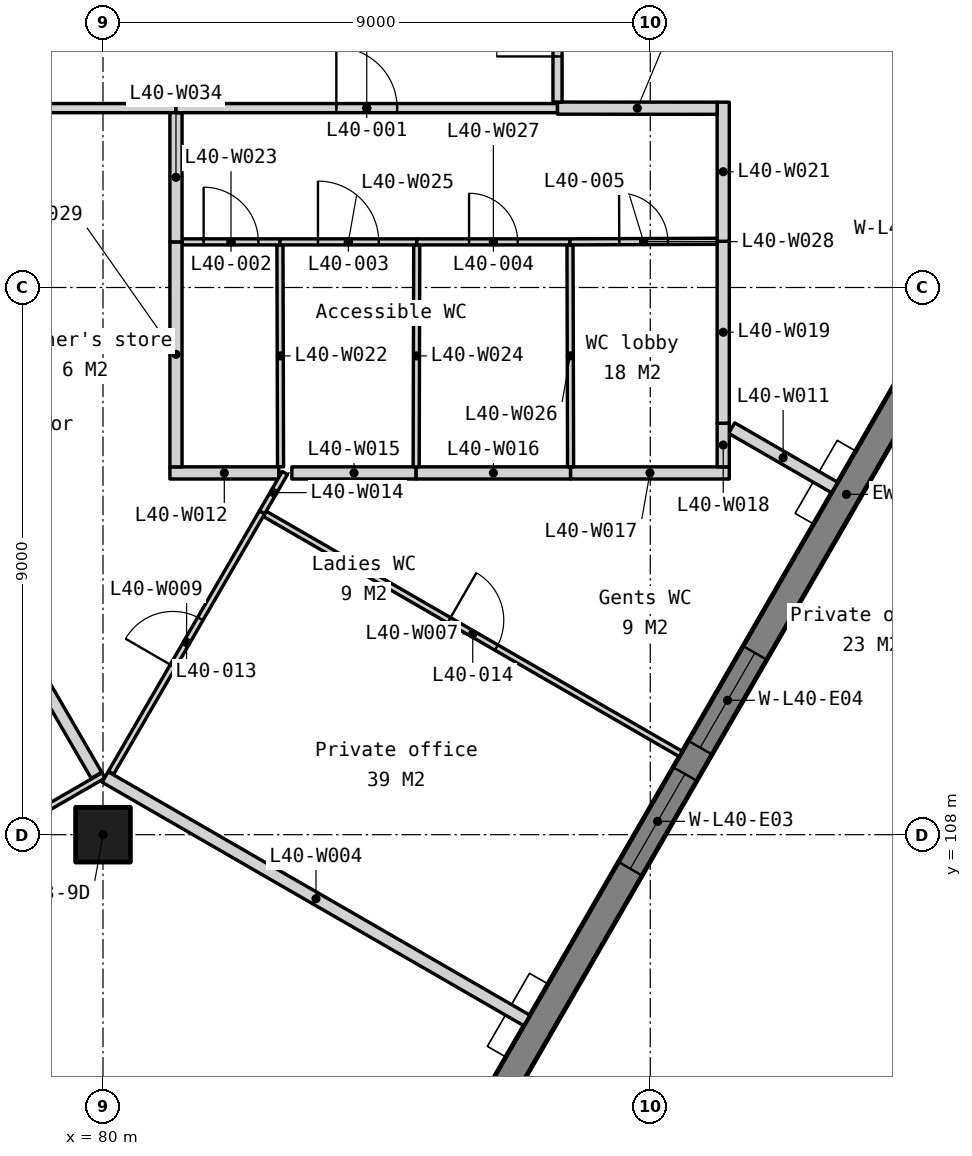
"""IFC4 building model, lengths in metres.
Left out: names, types, materials, properties, quantities, classifications, styles, units other than length and angle.
Written with IfcOpenShell. Run it as: python <this file> out.ifc"""

import sys

from ifc_helpers import new_model, si_unit, direction, frame, frame_2d, origin, origin_2d, place, context, subcontext, project, spatial, polyline, rectangle, outline, extrude, element, fill, save


model = new_model("IFC4")
c1 = context("Model", 3, precision=1e-05, world=origin(), true_north=direction((0.0, 1.0)))
c2 = subcontext(c1, "Body", "Model", "MODEL_VIEW")
j1 = project(units=[si_unit("LENGTHUNIT", "METRE"), si_unit("PLANEANGLEUNIT", "RADIAN")], contexts=[c1])
p1 = place(None, origin())
s1 = spatial("IfcSite", under=j1, at=p1, CompositionType="ELEMENT")
p2 = place(p1, origin())
s2 = spatial("IfcBuilding", under=s1, at=p2, CompositionType="ELEMENT")
p3 = place(p2, frame((0.0, 0.0, 159.8)))
s3 = spatial("IfcBuildingStorey", under=s2, at=p3, CompositionType="ELEMENT", Elevation=159.8)
p4 = place(p3, frame((80.0, 108.0, 0.0), z_axis=(0.0, 0.0, 1.0), x_axis=(1.0, 0.0, 0.0)))
e1 = element("IfcColumn", 1, at=p4, inside=s3, PredefinedType="COLUMN", context=c2, shape_type="SweptSolid", body=[
    extrude(rectangle(XDim=0.9, YDim=0.9, at=origin_2d()), origin(), (0.0, 0.0, 1.0), 3.9),
])
p5 = place(p3, frame((82.105, 96.067, -0.15), z_axis=(0.0, 0.0, 1.0), x_axis=(0.499997369791, 0.866026922331, 0.0)))
e2 = element("IfcWall", 2, at=p5, inside=s3, PredefinedType="SOLIDWALL", context=c2, shape_type="SweptSolid", body=[
    extrude(outline(polyline([(40.486, 0.0), (40.486, 3.9), (0.0, 3.9), (0.0, 0.0), (40.486, 0.0)])), frame((0.0, 0.225, 0.0), z_axis=(0.0, -1.0, 0.0), x_axis=(1.0, 0.0, 0.0)), (0.0, 0.0, 1.0), 0.45),
])
p6 = place(p5, frame((3.011, 0.0, 0.95)))
e3 = element("IfcOpeningElement", 3, at=p6, cuts=e2, PredefinedType="OPENING", context=c2, shape_type="SweptSolid", body=[
    extrude(rectangle(XDim=1.8, YDim=2.2, at=frame_2d((0.9, 1.1))), frame((0.0, 0.235, 0.0), z_axis=(0.0, -1.0, 0.0), x_axis=(1.0, 0.0, 0.0)), (0.0, 0.0, 1.0), 0.47),
])
p7 = place(p5, frame((5.311, 0.0, 0.95)))
e4 = element("IfcOpeningElement", 4, at=p7, cuts=e2, PredefinedType="OPENING", context=c2, shape_type="SweptSolid", body=[
    extrude(rectangle(XDim=1.8, YDim=2.2, at=frame_2d((0.9, 1.1))), frame((0.0, 0.235, 0.0), z_axis=(0.0, -1.0, 0.0), x_axis=(1.0, 0.0, 0.0)), (0.0, 0.0, 1.0), 0.47),
])
p8 = place(p5, frame((13.132, 0.0, 0.95)))
e5 = element("IfcOpeningElement", 5, at=p8, cuts=e2, PredefinedType="OPENING", context=c2, shape_type="SweptSolid", body=[
    extrude(rectangle(XDim=1.8, YDim=2.2, at=frame_2d((0.9, 1.1))), frame((0.0, 0.235, 0.0), z_axis=(0.0, -1.0, 0.0), x_axis=(1.0, 0.0, 0.0)), (0.0, 0.0, 1.0), 0.47),
])
p9 = place(p5, frame((15.432, 0.0, 0.95)))
e6 = element("IfcOpeningElement", 6, at=p9, cuts=e2, PredefinedType="OPENING", context=c2, shape_type="SweptSolid", body=[
    extrude(rectangle(XDim=1.8, YDim=2.2, at=frame_2d((0.9, 1.1))), frame((0.0, 0.235, 0.0), z_axis=(0.0, -1.0, 0.0), x_axis=(1.0, 0.0, 0.0)), (0.0, 0.0, 1.0), 0.47),
])
p10 = place(p5, frame((23.254, 0.0, 0.95)))
e7 = element("IfcOpeningElement", 7, at=p10, cuts=e2, PredefinedType="OPENING", context=c2, shape_type="SweptSolid", body=[
    extrude(rectangle(XDim=1.8, YDim=2.2, at=frame_2d((0.9, 1.1))), frame((0.0, 0.235, 0.0), z_axis=(0.0, -1.0, 0.0), x_axis=(1.0, 0.0, 0.0)), (0.0, 0.0, 1.0), 0.47),
])
p11 = place(p5, frame((25.554, 0.0, 0.95)))
e8 = element("IfcOpeningElement", 8, at=p11, cuts=e2, PredefinedType="OPENING", context=c2, shape_type="SweptSolid", body=[
    extrude(rectangle(XDim=1.8, YDim=2.2, at=frame_2d((0.9, 1.1))), frame((0.0, 0.235, 0.0), z_axis=(0.0, -1.0, 0.0), x_axis=(1.0, 0.0, 0.0)), (0.0, 0.0, 1.0), 0.47),
])
p12 = place(p5, frame((33.375, 0.0, 0.95)))
e9 = element("IfcOpeningElement", 9, at=p12, cuts=e2, PredefinedType="OPENING", context=c2, shape_type="SweptSolid", body=[
    extrude(rectangle(XDim=1.8, YDim=2.2, at=frame_2d((0.9, 1.1))), frame((0.0, 0.235, 0.0), z_axis=(0.0, -1.0, 0.0), x_axis=(1.0, 0.0, 0.0)), (0.0, 0.0, 1.0), 0.47),
])
p13 = place(p5, frame((35.675, 0.0, 0.95)))
e10 = element("IfcOpeningElement", 10, at=p13, cuts=e2, PredefinedType="OPENING", context=c2, shape_type="SweptSolid", body=[
    extrude(rectangle(XDim=1.8, YDim=2.2, at=frame_2d((0.9, 1.1))), frame((0.0, 0.235, 0.0), z_axis=(0.0, -1.0, 0.0), x_axis=(1.0, 0.0, 0.0)), (0.0, 0.0, 1.0), 0.47),
])
p14 = place(p3, frame((73.029, 104.945, 0.0), z_axis=(0.0, 0.0, 1.0), x_axis=(0.866018113567, 0.500012626815, 0.0)))
e11 = element("IfcWall", 11, at=p14, inside=s3, PredefinedType="PARTITIONING", context=c2, shape_type="SweptSolid", body=[
    extrude(rectangle(XDim=8.06, YDim=0.1, at=frame_2d((4.03, 0.0))), origin(), (0.0, 0.0, 1.0), 3.75),
])
p15 = place(p14, frame((3.58, 0.0, 0.0)))
e12 = element("IfcOpeningElement", 12, at=p15, cuts=e11, PredefinedType="OPENING", context=c2, shape_type="SweptSolid", body=[
    extrude(rectangle(XDim=0.9, YDim=2.1, at=frame_2d((0.45, 1.05))), frame((0.0, 0.06, 0.0), z_axis=(0.0, -1.0, 0.0), x_axis=(1.0, 0.0, 0.0)), (0.0, 0.0, 1.0), 0.12),
])
p16 = place(p3, frame((77.384, 113.302, 0.0), z_axis=(0.0, 0.0, 1.0), x_axis=(0.501680827225, -0.865052800467, 0.0)))
e13 = element("IfcWall", 13, at=p16, inside=s3, PredefinedType="PARTITIONING", context=c2, shape_type="SweptSolid", body=[
    extrude(rectangle(XDim=5.001, YDim=0.2, at=frame_2d((2.5, 0.0))), origin(), (0.0, 0.0, 1.0), 3.75),
])
p17 = place(p3, frame((80.034, 108.95, 0.0), z_axis=(0.0, 0.0, 1.0), x_axis=(0.866028745538, -0.499994211868, 0.0)))
e14 = element("IfcWall", 14, at=p17, inside=s3, PredefinedType="PARTITIONING", context=c2, shape_type="SweptSolid", body=[
    extrude(rectangle(XDim=8.01, YDim=0.2, at=frame_2d((4.005, 0.0))), origin(), (0.0, 0.0, 1.0), 3.75),
])
p18 = place(p3, frame((82.66, 113.278, 0.0), z_axis=(0.0, 0.0, 1.0), x_axis=(0.866013180616, -0.500021170551, 0.0)))
e15 = element("IfcWall", 15, at=p18, inside=s3, PredefinedType="PARTITIONING", context=c2, shape_type="SweptSolid", body=[
    extrude(rectangle(XDim=7.9, YDim=0.1, at=frame_2d((3.95, 0.0))), origin(), (0.0, 0.0, 1.0), 3.75),
])
p19 = place(p18, frame((3.5, 0.0, 0.0)))
e16 = element("IfcOpeningElement", 16, at=p19, cuts=e15, PredefinedType="OPENING", context=c2, shape_type="SweptSolid", body=[
    extrude(rectangle(XDim=0.9, YDim=2.1, at=frame_2d((0.45, 1.05))), frame((0.0, 0.06, 0.0), z_axis=(0.0, -1.0, 0.0), x_axis=(1.0, 0.0, 0.0)), (0.0, 0.0, 1.0), 0.12),
])
p20 = place(p3, frame((80.133, 109.02, 0.0), z_axis=(0.0, 0.0, 1.0), x_axis=(0.501726207978, 0.865026480651, 0.0)))
e17 = element("IfcWall", 17, at=p20, inside=s3, PredefinedType="PARTITIONING", context=c2, shape_type="SweptSolid", body=[
    extrude(rectangle(XDim=4.951, YDim=0.1, at=frame_2d((2.475, 0.0))), origin(), (0.0, 0.0, 1.0), 3.75),
])
p21 = place(p20, frame((2.025, 0.0, 0.0)))
e18 = element("IfcOpeningElement", 18, at=p21, cuts=e17, PredefinedType="OPENING", context=c2, shape_type="SweptSolid", body=[
    extrude(rectangle(XDim=0.9, YDim=2.1, at=frame_2d((0.45, 1.05))), frame((0.0, 0.06, 0.0), z_axis=(0.0, -1.0, 0.0), x_axis=(1.0, 0.0, 0.0)), (0.0, 0.0, 1.0), 0.12),
])
p22 = place(p3, frame((90.339, 114.688, 0.0), z_axis=(0.0, 0.0, 1.0), x_axis=(0.866021300503, -0.500007107024, 0.0)))
e19 = element("IfcWall", 19, at=p22, inside=s3, PredefinedType="PARTITIONING", context=c2, shape_type="SweptSolid", body=[
    extrude(rectangle(XDim=1.955, YDim=0.2, at=frame_2d((0.978, 0.0))), origin(), (0.0, 0.0, 1.0), 3.75),
])
p23 = place(p3, frame((81.1, 113.95, 0.0), z_axis=(0.0, 0.0, 1.0), x_axis=(1.0, 0.0, 0.0)))
e20 = element("IfcWall", 20, at=p23, inside=s3, PredefinedType="PARTITIONING", context=c2, shape_type="SweptSolid", body=[
    extrude(rectangle(XDim=1.79, YDim=0.2, at=frame_2d((0.895, 0.0))), origin(), (0.0, 0.0, 1.0), 3.75),
])
p24 = place(p3, frame((82.616, 113.302, 0.0), z_axis=(0.0, 0.0, 1.0), x_axis=(0.500212318761, 0.865902786784, 0.0)))
e21 = element("IfcWall", 21, at=p24, inside=s3, PredefinedType="PARTITIONING", context=c2, shape_type="SweptSolid", body=[
    extrude(rectangle(XDim=0.748, YDim=0.1, at=frame_2d((0.374, 0.0))), origin(), (0.0, 0.0, 1.0), 3.75),
])
p25 = place(p3, frame((83.106, 113.95, 0.0), z_axis=(0.0, 0.0, 1.0), x_axis=(1.0, 0.0, 0.0)))
e22 = element("IfcWall", 22, at=p25, inside=s3, PredefinedType="PARTITIONING", context=c2, shape_type="SweptSolid", body=[
    extrude(rectangle(XDim=2.044, YDim=0.2, at=frame_2d((1.022, 0.0))), origin(), (0.0, 0.0, 1.0), 3.75),
])
p26 = place(p3, frame((85.15, 113.95, 0.0), z_axis=(0.0, 0.0, 1.0), x_axis=(1.0, 0.0, 0.0)))
e23 = element("IfcWall", 23, at=p26, inside=s3, PredefinedType="PARTITIONING", context=c2, shape_type="SweptSolid", body=[
    extrude(rectangle(XDim=2.54, YDim=0.2, at=frame_2d((1.27, 0.0))), origin(), (0.0, 0.0, 1.0), 3.75),
])
p27 = place(p3, frame((87.69, 113.95, 0.0), z_axis=(0.0, 0.0, 1.0), x_axis=(1.0, 0.0, 0.0)))
e24 = element("IfcWall", 24, at=p27, inside=s3, PredefinedType="PARTITIONING", context=c2, shape_type="SweptSolid", body=[
    extrude(rectangle(XDim=2.61, YDim=0.2, at=frame_2d((1.305, 0.0))), origin(), (0.0, 0.0, 1.0), 3.75),
])
p28 = place(p3, frame((90.2, 114.05, 0.0), z_axis=(0.0, 0.0, 1.0), x_axis=(0.0, 1.0, 0.0)))
e25 = element("IfcWall", 25, at=p28, inside=s3, PredefinedType="PARTITIONING", context=c2, shape_type="SweptSolid", body=[
    extrude(rectangle(XDim=0.718, YDim=0.2, at=frame_2d((0.359, 0.0))), origin(), (0.0, 0.0, 1.0), 3.75),
])
p29 = place(p3, frame((90.2, 114.768, 0.0), z_axis=(0.0, 0.0, 1.0), x_axis=(0.0, 1.0, 0.0)))
e26 = element("IfcWall", 26, at=p29, inside=s3, PredefinedType="PARTITIONING", context=c2, shape_type="SweptSolid", body=[
    extrude(rectangle(XDim=2.992, YDim=0.2, at=frame_2d((1.496, 0.0))), origin(), (0.0, 0.0, 1.0), 3.75),
])
p30 = place(p3, frame((90.2, 117.76, 0.0), z_axis=(0.0, 0.0, 1.0), x_axis=(0.0, 1.0, 0.0)))
e27 = element("IfcWall", 27, at=p30, inside=s3, PredefinedType="PARTITIONING", context=c2, shape_type="SweptSolid", body=[
    extrude(rectangle(XDim=2.288, YDim=0.2, at=frame_2d((1.144, 0.0))), origin(), (0.0, 0.0, 1.0), 3.75),
])
p31 = place(p3, frame((82.92, 114.05, 0.0), z_axis=(0.0, 0.0, 1.0), x_axis=(-0.002608686776, 0.999996597371, 0.0)))
e28 = element("IfcWall", 28, at=p31, inside=s3, PredefinedType="PARTITIONING", context=c2, shape_type="SweptSolid", body=[
    extrude(rectangle(XDim=3.65, YDim=0.1, at=frame_2d((1.825, 0.0))), origin(), (0.0, 0.0, 1.0), 3.75),
])
p32 = place(p3, frame((81.3, 117.75, 0.0), z_axis=(0.0, 0.0, 1.0), x_axis=(1.0, 0.0, 0.0)))
e29 = element("IfcWall", 29, at=p32, inside=s3, PredefinedType="PARTITIONING", context=c2, shape_type="SweptSolid", body=[
    extrude(rectangle(XDim=1.61, YDim=0.1, at=frame_2d((0.805, 0.0))), origin(), (0.0, 0.0, 1.0), 3.75),
])
p33 = place(p32, frame((0.355, 0.0, 0.0)))
e30 = element("IfcOpeningElement", 30, at=p33, cuts=e29, PredefinedType="OPENING", context=c2, shape_type="SweptSolid", body=[
    extrude(rectangle(XDim=0.9, YDim=2.1, at=frame_2d((0.45, 1.05))), frame((0.0, 0.06, 0.0), z_axis=(0.0, -1.0, 0.0), x_axis=(1.0, 0.0, 0.0)), (0.0, 0.0, 1.0), 0.12),
])
p34 = place(p3, frame((85.15, 114.05, 0.0), z_axis=(0.0, 0.0, 1.0), x_axis=(0.002675575707, 0.999996420641, 0.0)))
e31 = element("IfcWall", 31, at=p34, inside=s3, PredefinedType="PARTITIONING", context=c2, shape_type="SweptSolid", body=[
    extrude(rectangle(XDim=3.65, YDim=0.1, at=frame_2d((1.825, 0.0))), origin(), (0.0, 0.0, 1.0), 3.75),
])
p35 = place(p3, frame((82.91, 117.75, 0.0), z_axis=(0.0, 0.0, 1.0), x_axis=(1.0, 0.0, 0.0)))
e32 = element("IfcWall", 32, at=p35, inside=s3, PredefinedType="PARTITIONING", context=c2, shape_type="SweptSolid", body=[
    extrude(rectangle(XDim=2.25, YDim=0.1, at=frame_2d((1.125, 0.0))), origin(), (0.0, 0.0, 1.0), 3.75),
])
p36 = place(p35, frame((0.625, 0.0, 0.0)))
e33 = element("IfcOpeningElement", 33, at=p36, cuts=e32, PredefinedType="OPENING", context=c2, shape_type="SweptSolid", body=[
    extrude(rectangle(XDim=1.0, YDim=2.1, at=frame_2d((0.5, 1.05))), frame((0.0, 0.06, 0.0), z_axis=(0.0, -1.0, 0.0), x_axis=(1.0, 0.0, 0.0)), (0.0, 0.0, 1.0), 0.12),
])
p37 = place(p3, frame((87.69, 114.05, 0.0), z_axis=(0.0, 0.0, 1.0), x_axis=(-0.002608686776, 0.999996597371, 0.0)))
e34 = element("IfcWall", 34, at=p37, inside=s3, PredefinedType="PARTITIONING", context=c2, shape_type="SweptSolid", body=[
    extrude(rectangle(XDim=3.65, YDim=0.1, at=frame_2d((1.825, 0.0))), origin(), (0.0, 0.0, 1.0), 3.75),
])
p38 = place(p3, frame((85.16, 117.75, 0.0), z_axis=(0.0, 0.0, 1.0), x_axis=(1.0, 0.0, 0.0)))
e35 = element("IfcWall", 35, at=p38, inside=s3, PredefinedType="PARTITIONING", context=c2, shape_type="SweptSolid", body=[
    extrude(rectangle(XDim=2.52, YDim=0.1, at=frame_2d((1.26, 0.0))), origin(), (0.0, 0.0, 1.0), 3.75),
])
p39 = place(p38, frame((0.86, 0.0, 0.0)))
e36 = element("IfcOpeningElement", 36, at=p39, cuts=e35, PredefinedType="OPENING", context=c2, shape_type="SweptSolid", body=[
    extrude(rectangle(XDim=0.8, YDim=2.1, at=frame_2d((0.4, 1.05))), frame((0.0, 0.06, 0.0), z_axis=(0.0, -1.0, 0.0), x_axis=(1.0, 0.0, 0.0)), (0.0, 0.0, 1.0), 0.12),
])
p40 = place(p3, frame((87.68, 117.75, 0.0), z_axis=(0.0, 0.0, 1.0), x_axis=(0.999992261016, 0.003934197335, 0.0)))
e37 = element("IfcWall", 37, at=p40, inside=s3, PredefinedType="PARTITIONING", context=c2, shape_type="SweptSolid", body=[
    extrude(rectangle(XDim=2.42, YDim=0.1, at=frame_2d((1.21, 0.0))), origin(), (0.0, 0.0, 1.0), 3.75),
])
p41 = place(p40, frame((0.81, 0.0, 0.0)))
e38 = element("IfcOpeningElement", 38, at=p41, cuts=e37, PredefinedType="OPENING", context=c2, shape_type="SweptSolid", body=[
    extrude(rectangle(XDim=0.8, YDim=2.1, at=frame_2d((0.4, 1.05))), frame((0.0, 0.06, 0.0), z_axis=(0.0, -1.0, 0.0), x_axis=(1.0, 0.0, 0.0)), (0.0, 0.0, 1.0), 0.12),
])
p42 = place(p3, frame((81.2, 114.05, 0.0), z_axis=(0.0, 0.0, 1.0), x_axis=(0.0, 1.0, 0.0)))
e39 = element("IfcWall", 39, at=p42, inside=s3, PredefinedType="PARTITIONING", context=c2, shape_type="SweptSolid", body=[
    extrude(rectangle(XDim=3.7, YDim=0.2, at=frame_2d((1.85, 0.0))), origin(), (0.0, 0.0, 1.0), 3.75),
])
p43 = place(p3, frame((73.545, 119.95, 0.0), z_axis=(0.0, 0.0, 1.0), x_axis=(1.0, 0.0, 0.0)))
e40 = element("IfcWall", 40, at=p43, inside=s3, PredefinedType="PARTITIONING", context=c2, shape_type="SweptSolid", body=[
    extrude(rectangle(XDim=7.655, YDim=0.15, at=frame_2d((3.827, 0.0))), origin(), (0.0, 0.0, 1.0), 3.75),
])
p44 = place(p43, frame((2.927, 0.0, 0.0)))
e41 = element("IfcOpeningElement", 41, at=p44, cuts=e40, PredefinedType="OPENING", context=c2, shape_type="SweptSolid", body=[
    extrude(rectangle(XDim=1.8, YDim=2.1, at=frame_2d((0.9, 1.05))), frame((0.0, 0.085, 0.0), z_axis=(0.0, -1.0, 0.0), x_axis=(1.0, 0.0, 0.0)), (0.0, 0.0, 1.0), 0.17),
])
p45 = place(p3, frame((81.2, 117.75, 0.0), z_axis=(0.0, 0.0, 1.0), x_axis=(0.0, 1.0, 0.0)))
e42 = element("IfcWall", 42, at=p45, inside=s3, PredefinedType="PARTITIONING", context=c2, shape_type="SweptSolid", body=[
    extrude(rectangle(XDim=2.125, YDim=0.2, at=frame_2d((1.062, 0.0))), origin(), (0.0, 0.0, 1.0), 3.75),
])
p46 = place(p3, frame((81.2, 119.95, 0.0), z_axis=(0.0, 0.0, 1.0), x_axis=(1.0, 0.0, 0.0)))
e43 = element("IfcWall", 43, at=p46, inside=s3, PredefinedType="PARTITIONING", context=c2, shape_type="SweptSolid", body=[
    extrude(rectangle(XDim=6.275, YDim=0.15, at=frame_2d((3.138, 0.0))), origin(), (0.0, 0.0, 1.0), 3.75),
])
p47 = place(p46, frame((2.637, 0.0, 0.0)))
e44 = element("IfcOpeningElement", 44, at=p47, cuts=e43, PredefinedType="OPENING", context=c2, shape_type="SweptSolid", body=[
    extrude(rectangle(XDim=1.0, YDim=2.1, at=frame_2d((0.5, 1.05))), frame((0.0, 0.085, 0.0), z_axis=(0.0, -1.0, 0.0), x_axis=(1.0, 0.0, 0.0)), (0.0, 0.0, 1.0), 0.17),
])
p48 = place(p3, frame((87.475, 119.95, 0.0), z_axis=(0.0, 0.0, 1.0), x_axis=(0.999999723197, -0.000744047413, 0.0)))
e45 = element("IfcWall", 45, at=p48, inside=s3, PredefinedType="PARTITIONING", context=c2, shape_type="SweptSolid", body=[
    extrude(rectangle(XDim=2.625, YDim=0.2, at=frame_2d((1.312, 0.0))), origin(), (0.0, 0.0, 1.0), 3.75),
])
p49 = place(p3, frame((87.475, 120.05, 0.0), z_axis=(0.0, 0.0, 1.0), x_axis=(0.0, 1.0, 0.0)))
e46 = element("IfcWall", 46, at=p49, inside=s3, PredefinedType="PARTITIONING", context=c2, shape_type="SweptSolid", body=[
    extrude(rectangle(XDim=2.5, YDim=0.15, at=frame_2d((1.25, 0.0))), origin(), (0.0, 0.0, 1.0), 3.75),
])
p50 = place(p49, frame((0.75, 0.0, 0.0)))
e47 = element("IfcOpeningElement", 47, at=p50, cuts=e46, PredefinedType="OPENING", context=c2, shape_type="SweptSolid", body=[
    extrude(rectangle(XDim=1.0, YDim=2.1, at=frame_2d((0.5, 1.05))), frame((0.0, 0.085, 0.0), z_axis=(0.0, -1.0, 0.0), x_axis=(1.0, 0.0, 0.0)), (0.0, 0.0, 1.0), 0.17),
])
p51 = place(p8, origin())
e48 = element("IfcWindow", 48, at=p51, inside=s3, PartitioningType="SINGLE_PANEL", PredefinedType="WINDOW", context=c2, shape_type="SweptSolid", body=[
    extrude(rectangle(XDim=1.8, YDim=2.2, at=frame_2d((0.9, 1.1))), frame((0.0, 0.03, 0.0), z_axis=(0.0, -1.0, 0.0), x_axis=(1.0, 0.0, 0.0)), (0.0, 0.0, 1.0), 0.06),
])
fill(e5, e48)
p52 = place(p9, origin())
e49 = element("IfcWindow", 49, at=p52, inside=s3, PartitioningType="SINGLE_PANEL", PredefinedType="WINDOW", context=c2, shape_type="SweptSolid", body=[
    extrude(rectangle(XDim=1.8, YDim=2.2, at=frame_2d((0.9, 1.1))), frame((0.0, 0.03, 0.0), z_axis=(0.0, -1.0, 0.0), x_axis=(1.0, 0.0, 0.0)), (0.0, 0.0, 1.0), 0.06),
])
fill(e6, e49)
p53 = place(p47, origin())
e50 = element("IfcDoor", 50, at=p53, inside=s3, OperationType="SINGLE_SWING_LEFT", PredefinedType="DOOR", context=c2, shape_type="SweptSolid", body=[
    extrude(rectangle(XDim=1.0, YDim=2.1, at=frame_2d((0.5, 1.05))), frame((0.0, 0.025, 0.0), z_axis=(0.0, -1.0, 0.0), x_axis=(1.0, 0.0, 0.0)), (0.0, 0.0, 1.0), 0.05),
])
fill(e44, e50)
p54 = place(p33, origin())
e51 = element("IfcDoor", 51, at=p54, inside=s3, OperationType="SINGLE_SWING_LEFT", PredefinedType="DOOR", context=c2, shape_type="SweptSolid", body=[
    extrude(rectangle(XDim=0.9, YDim=2.1, at=frame_2d((0.45, 1.05))), frame((0.0, 0.025, 0.0), z_axis=(0.0, -1.0, 0.0), x_axis=(1.0, 0.0, 0.0)), (0.0, 0.0, 1.0), 0.05),
])
fill(e30, e51)
p55 = place(p36, origin())
e52 = element("IfcDoor", 52, at=p55, inside=s3, OperationType="SINGLE_SWING_LEFT", PredefinedType="DOOR", context=c2, shape_type="SweptSolid", body=[
    extrude(rectangle(XDim=1.0, YDim=2.1, at=frame_2d((0.5, 1.05))), frame((0.0, 0.025, 0.0), z_axis=(0.0, -1.0, 0.0), x_axis=(1.0, 0.0, 0.0)), (0.0, 0.0, 1.0), 0.05),
])
fill(e33, e52)
p56 = place(p39, origin())
e53 = element("IfcDoor", 53, at=p56, inside=s3, OperationType="SINGLE_SWING_LEFT", PredefinedType="DOOR", context=c2, shape_type="SweptSolid", body=[
    extrude(rectangle(XDim=0.8, YDim=2.1, at=frame_2d((0.4, 1.05))), frame((0.0, 0.025, 0.0), z_axis=(0.0, -1.0, 0.0), x_axis=(1.0, 0.0, 0.0)), (0.0, 0.0, 1.0), 0.05),
])
fill(e36, e53)
p57 = place(p41, origin())
e54 = element("IfcDoor", 54, at=p57, inside=s3, OperationType="SINGLE_SWING_LEFT", PredefinedType="DOOR", context=c2, shape_type="SweptSolid", body=[
    extrude(rectangle(XDim=0.8, YDim=2.1, at=frame_2d((0.4, 1.05))), frame((0.0, 0.025, 0.0), z_axis=(0.0, -1.0, 0.0), x_axis=(1.0, 0.0, 0.0)), (0.0, 0.0, 1.0), 0.05),
])
fill(e38, e54)
p58 = place(p21, origin())
e55 = element("IfcDoor", 55, at=p58, inside=s3, OperationType="SINGLE_SWING_LEFT", PredefinedType="DOOR", context=c2, shape_type="SweptSolid", body=[
    extrude(rectangle(XDim=0.9, YDim=2.1, at=frame_2d((0.45, 1.05))), frame((0.0, 0.025, 0.0), z_axis=(0.0, -1.0, 0.0), x_axis=(1.0, 0.0, 0.0)), (0.0, 0.0, 1.0), 0.05),
])
fill(e18, e55)
p59 = place(p19, origin())
e56 = element("IfcDoor", 56, at=p59, inside=s3, OperationType="SINGLE_SWING_LEFT", PredefinedType="DOOR", context=c2, shape_type="SweptSolid", body=[
    extrude(rectangle(XDim=0.9, YDim=2.1, at=frame_2d((0.45, 1.05))), frame((0.0, 0.025, 0.0), z_axis=(0.0, -1.0, 0.0), x_axis=(1.0, 0.0, 0.0)), (0.0, 0.0, 1.0), 0.05),
])
fill(e16, e56)
p60 = place(p50, origin())
e57 = element("IfcDoor", 57, at=p60, inside=s3, OperationType="SINGLE_SWING_LEFT", PredefinedType="DOOR", context=c2, shape_type="SweptSolid", body=[
    extrude(rectangle(XDim=1.0, YDim=2.1, at=frame_2d((0.5, 1.05))), frame((0.0, 0.025, 0.0), z_axis=(0.0, -1.0, 0.0), x_axis=(1.0, 0.0, 0.0)), (0.0, 0.0, 1.0), 0.05),
])
fill(e47, e57)
save(model, sys.argv[1])
